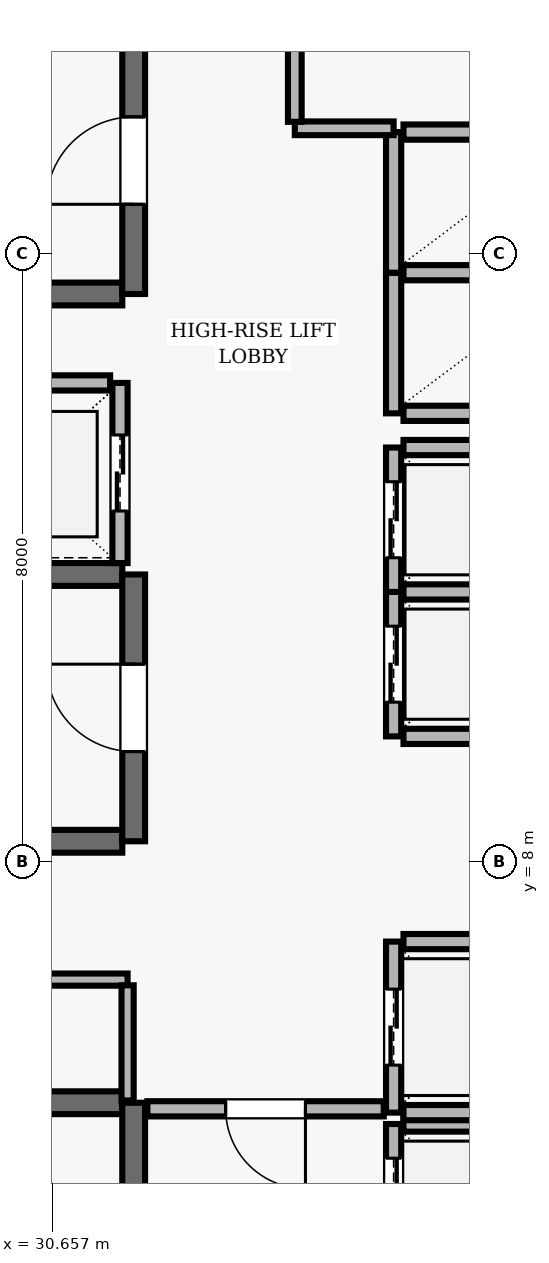
"""IFC4 building model, lengths in metres.
Left out: names, types, materials, properties, quantities, classifications, styles, units other than length and angle.
Written with IfcOpenShell. Run it as: python <this file> out.ifc"""

import sys

from ifc_helpers import new_model, si_unit, direction, frame, frame_2d, origin, place, context, subcontext, project, spatial, rectangle, extrude, element, fill, save


model = new_model("IFC4")
c1 = context("Model", 3, precision=1e-05, world=origin(), true_north=direction((0.0, 1.0)))
c2 = subcontext(c1, "Body", "Model", "MODEL_VIEW")
j1 = project(units=[si_unit("LENGTHUNIT", "METRE"), si_unit("PLANEANGLEUNIT", "RADIAN")], contexts=[c1])
p1 = place(None, origin())
s1 = spatial("IfcSite", under=j1, at=p1, CompositionType="ELEMENT")
p2 = place(p1, origin())
s2 = spatial("IfcBuilding", under=s1, at=p2, CompositionType="ELEMENT")
p3 = place(p2, frame((0.0, 0.0, 279.4)))
s3 = spatial("IfcBuildingStorey", under=s2, at=p3, CompositionType="ELEMENT", Elevation=279.4)
p4 = place(p3, frame((31.58, 4.83, 0.0), z_axis=(0.0, 0.0, 1.0), x_axis=(-1.0, 0.0, 0.0)))
e1 = element("IfcWall", 1, at=p4, inside=s3, PredefinedType="SHEAR", context=c2, shape_type="SweptSolid", body=[
    extrude(rectangle(XDim=8.36, YDim=0.3, at=frame_2d((4.18, 0.0))), origin(), (0.0, 0.0, 1.0), 3.69),
])
p5 = place(p3, frame((31.73, 0.96, 0.0), z_axis=(0.0, 0.0, 1.0), x_axis=(0.0, 1.0, 0.0)))
e2 = element("IfcWall", 2, at=p5, inside=s3, PredefinedType="SHEAR", context=c2, shape_type="SweptSolid", body=[
    extrude(rectangle(XDim=3.87, YDim=0.3, at=frame_2d((1.935, 0.0))), origin(), (0.0, 0.0, 1.0), 3.69),
])
p6 = place(p5, frame((1.54, 0.0, 0.0)))
e3 = element("IfcOpeningElement", 3, at=p6, cuts=e2, PredefinedType="OPENING", context=c2, shape_type="SweptSolid", body=[
    extrude(rectangle(XDim=1.15, YDim=2.15, at=frame_2d((0.575, 1.075))), frame((0.0, 0.16, 0.0), z_axis=(0.0, -1.0, 0.0), x_axis=(1.0, 0.0, 0.0)), (0.0, 0.0, 1.0), 0.32),
])
p7 = place(p3, frame((23.22, 15.47, 0.0), z_axis=(0.0, 0.0, 1.0), x_axis=(1.0, 0.0, 0.0)))
e4 = element("IfcWall", 4, at=p7, inside=s3, PredefinedType="SHEAR", context=c2, shape_type="SweptSolid", body=[
    extrude(rectangle(XDim=8.36, YDim=0.3, at=frame_2d((4.18, 0.0))), origin(), (0.0, 0.0, 1.0), 3.69),
])
p8 = place(p3, frame((31.73, 15.47, 0.0), z_axis=(0.0, 0.0, 1.0), x_axis=(0.0, 1.0, 0.0)))
e5 = element("IfcWall", 5, at=p8, inside=s3, PredefinedType="SHEAR", context=c2, shape_type="SweptSolid", body=[
    extrude(rectangle(XDim=3.51, YDim=0.3, at=frame_2d((1.755, 0.0))), origin(), (0.0, 0.0, 1.0), 3.69),
])
p9 = place(p8, frame((1.18, 0.0, 0.0)))
e6 = element("IfcOpeningElement", 6, at=p9, cuts=e5, PredefinedType="OPENING", context=c2, shape_type="SweptSolid", body=[
    extrude(rectangle(XDim=1.15, YDim=2.15, at=frame_2d((0.575, 1.075))), frame((0.0, 0.16, 0.0), z_axis=(0.0, -1.0, 0.0), x_axis=(1.0, 0.0, 0.0)), (0.0, 0.0, 1.0), 0.32),
])
for number, where, z_axis, x_axis in (
    (7, (31.58, 11.78, 0.0), (0.0, 0.0, 1.0), (-1.0, 0.0, 0.0)),
    (8, (23.22, 8.27, 0.0), (0.0, 0.0, 1.0), (1.0, 0.0, 0.0)),
):
    element("IfcWall", number, at=place(p3, frame(where, z_axis=z_axis, x_axis=x_axis)), inside=s3, PredefinedType="SHEAR", context=c2, shape_type="SweptSolid", body=[
        extrude(rectangle(XDim=8.36, YDim=0.3, at=frame_2d((4.18, 0.0))), origin(), (0.0, 0.0, 1.0), 3.69),
    ])
p10 = place(p3, frame((31.73, 8.27, 0.0), z_axis=(0.0, 0.0, 1.0), x_axis=(0.0, 1.0, 0.0)))
e9 = element("IfcWall", 9, at=p10, inside=s3, PredefinedType="SHEAR", context=c2, shape_type="SweptSolid", body=[
    extrude(rectangle(XDim=3.51, YDim=0.3, at=frame_2d((1.755, 0.0))), origin(), (0.0, 0.0, 1.0), 3.69),
])
p11 = place(p10, frame((1.18, 0.0, 0.0)))
e10 = element("IfcOpeningElement", 10, at=p11, cuts=e9, PredefinedType="OPENING", context=c2, shape_type="SweptSolid", body=[
    extrude(rectangle(XDim=1.15, YDim=2.15, at=frame_2d((0.575, 1.075))), frame((0.0, 0.16, 0.0), z_axis=(0.0, -1.0, 0.0), x_axis=(1.0, 0.0, 0.0)), (0.0, 0.0, 1.0), 0.32),
])
p12 = place(p3, frame((35.15, 4.55, 0.0), z_axis=(0.0, 0.0, 1.0), x_axis=(0.0, -1.0, 0.0)))
e11 = element("IfcWall", 11, at=p12, inside=s3, PredefinedType="SOLIDWALL", context=c2, shape_type="SweptSolid", body=[
    extrude(rectangle(XDim=2.1, YDim=0.2, at=frame_2d((1.05, 0.0))), origin(), (0.0, 0.0, 1.0), 3.69),
])
p13 = place(p12, frame((0.45, 0.0, 0.0)))
e12 = element("IfcOpeningElement", 12, at=p13, cuts=e11, PredefinedType="OPENING", context=c2, shape_type="SweptSolid", body=[
    extrude(rectangle(XDim=1.2, YDim=2.15, at=frame_2d((0.6, 1.075))), frame((0.0, 0.11, 0.0), z_axis=(0.0, -1.0, 0.0), x_axis=(1.0, 0.0, 0.0)), (0.0, 0.0, 1.0), 0.22),
])
p14 = place(p3, frame((37.42, 4.55, 0.0), z_axis=(0.0, 0.0, 1.0), x_axis=(-1.0, 0.0, 0.0)))
e13 = element("IfcWall", 13, at=p14, inside=s3, PredefinedType="SOLIDWALL", context=c2, shape_type="SweptSolid", body=[
    extrude(rectangle(XDim=2.14, YDim=0.2, at=frame_2d((1.07, 0.0))), origin(), (0.0, 0.0, 1.0), 3.69),
])
p15 = place(p3, frame((35.15, 6.95, 0.0), z_axis=(0.0, 0.0, 1.0), x_axis=(0.0, -1.0, 0.0)))
e14 = element("IfcWall", 14, at=p15, inside=s3, PredefinedType="SOLIDWALL", context=c2, shape_type="SweptSolid", body=[
    extrude(rectangle(XDim=2.25, YDim=0.2, at=frame_2d((1.125, 0.0))), origin(), (0.0, 0.0, 1.0), 3.69),
])
p16 = place(p15, frame((0.625, 0.0, 0.0)))
e15 = element("IfcOpeningElement", 15, at=p16, cuts=e14, PredefinedType="OPENING", context=c2, shape_type="SweptSolid", body=[
    extrude(rectangle(XDim=1.0, YDim=2.1, at=frame_2d((0.5, 1.05))), frame((0.0, 0.11, 0.0), z_axis=(0.0, -1.0, 0.0), x_axis=(1.0, 0.0, 0.0)), (0.0, 0.0, 1.0), 0.22),
])
for number, where, z_axis, x_axis in (
    (16, (35.28, 4.7, 0.0), (0.0, 0.0, 1.0), (1.0, 0.0, 0.0)),
    (17, (37.42, 6.95, 0.0), (0.0, 0.0, 1.0), (-1.0, 0.0, 0.0)),
):
    element("IfcWall", number, at=place(p3, frame(where, z_axis=z_axis, x_axis=x_axis)), inside=s3, PredefinedType="SOLIDWALL", context=c2, shape_type="SweptSolid", body=[
        extrude(rectangle(XDim=2.14, YDim=0.2, at=frame_2d((1.07, 0.0))), origin(), (0.0, 0.0, 1.0), 3.69),
    ])
p17 = place(p3, frame((35.15, 11.55, 0.0), z_axis=(0.0, 0.0, 1.0), x_axis=(0.0, -1.0, 0.0)))
e18 = element("IfcWall", 18, at=p17, inside=s3, PredefinedType="SOLIDWALL", context=c2, shape_type="SweptSolid", body=[
    extrude(rectangle(XDim=1.9, YDim=0.2, at=frame_2d((0.95, 0.0))), origin(), (0.0, 0.0, 1.0), 3.69),
])
p18 = place(p17, frame((0.45, 0.0, 0.0)))
e19 = element("IfcOpeningElement", 19, at=p18, cuts=e18, PredefinedType="OPENING", context=c2, shape_type="SweptSolid", body=[
    extrude(rectangle(XDim=1.0, YDim=2.1, at=frame_2d((0.5, 1.05))), frame((0.0, 0.11, 0.0), z_axis=(0.0, -1.0, 0.0), x_axis=(1.0, 0.0, 0.0)), (0.0, 0.0, 1.0), 0.22),
])
for number, where, z_axis, x_axis in (
    (20, (35.28, 9.65, 0.0), (0.0, 0.0, 1.0), (1.0, 0.0, 0.0)),
    (21, (37.42, 11.55, 0.0), (0.0, 0.0, 1.0), (-1.0, 0.0, 0.0)),
):
    element("IfcWall", number, at=place(p3, frame(where, z_axis=z_axis, x_axis=x_axis)), inside=s3, PredefinedType="SOLIDWALL", context=c2, shape_type="SweptSolid", body=[
        extrude(rectangle(XDim=2.14, YDim=0.2, at=frame_2d((1.07, 0.0))), origin(), (0.0, 0.0, 1.0), 3.69),
    ])
p19 = place(p3, frame((35.15, 13.45, 0.0), z_axis=(0.0, 0.0, 1.0), x_axis=(0.0, -1.0, 0.0)))
e22 = element("IfcWall", 22, at=p19, inside=s3, PredefinedType="SOLIDWALL", context=c2, shape_type="SweptSolid", body=[
    extrude(rectangle(XDim=1.9, YDim=0.2, at=frame_2d((0.95, 0.0))), origin(), (0.0, 0.0, 1.0), 3.69),
])
p20 = place(p19, frame((0.45, 0.0, 0.0)))
e23 = element("IfcOpeningElement", 23, at=p20, cuts=e22, PredefinedType="OPENING", context=c2, shape_type="SweptSolid", body=[
    extrude(rectangle(XDim=1.0, YDim=2.1, at=frame_2d((0.5, 1.05))), frame((0.0, 0.11, 0.0), z_axis=(0.0, -1.0, 0.0), x_axis=(1.0, 0.0, 0.0)), (0.0, 0.0, 1.0), 0.22),
])
p21 = place(p3, frame((37.42, 13.45, 0.0), z_axis=(0.0, 0.0, 1.0), x_axis=(-1.0, 0.0, 0.0)))
e24 = element("IfcWall", 24, at=p21, inside=s3, PredefinedType="SOLIDWALL", context=c2, shape_type="SweptSolid", body=[
    extrude(rectangle(XDim=2.14, YDim=0.2, at=frame_2d((1.07, 0.0))), origin(), (0.0, 0.0, 1.0), 3.69),
])
p22 = place(p3, frame((31.55, 11.93, 0.0), z_axis=(0.0, 0.0, 1.0), x_axis=(0.0, 1.0, 0.0)))
e25 = element("IfcWall", 25, at=p22, inside=s3, PredefinedType="SOLIDWALL", context=c2, shape_type="SweptSolid", body=[
    extrude(rectangle(XDim=2.37, YDim=0.2, at=frame_2d((1.185, 0.0))), origin(), (0.0, 0.0, 1.0), 3.69),
])
p23 = place(p22, frame((0.685, 0.0, 0.0)))
e26 = element("IfcOpeningElement", 26, at=p23, cuts=e25, PredefinedType="OPENING", context=c2, shape_type="SweptSolid", body=[
    extrude(rectangle(XDim=1.0, YDim=2.1, at=frame_2d((0.5, 1.05))), frame((0.0, 0.11, 0.0), z_axis=(0.0, -1.0, 0.0), x_axis=(1.0, 0.0, 0.0)), (0.0, 0.0, 1.0), 0.22),
])
p24 = place(p3, frame((31.42, 14.3, 0.0), z_axis=(0.0, 0.0, 1.0), x_axis=(-1.0, 0.0, 0.0)))
e27 = element("IfcWall", 27, at=p24, inside=s3, PredefinedType="SOLIDWALL", context=c2, shape_type="SweptSolid", body=[
    extrude(rectangle(XDim=2.44, YDim=0.2, at=frame_2d((1.22, 0.0))), origin(), (0.0, 0.0, 1.0), 3.69),
])
p25 = place(p3, frame((35.15, 15.75, 0.0), z_axis=(0.0, 0.0, 1.0), x_axis=(0.0, -1.0, 0.0)))
e28 = element("IfcWall", 28, at=p25, inside=s3, PredefinedType="SOLIDWALL", context=c2, shape_type="SweptSolid", body=[
    extrude(rectangle(XDim=1.85, YDim=0.2, at=frame_2d((0.925, 0.0))), origin(), (0.0, 0.0, 1.0), 3.69),
])
for number, where, z_axis, x_axis in (
    (29, (35.28, 13.9, 0.0), (0.0, 0.0, 1.0), (1.0, 0.0, 0.0)),
    (30, (37.42, 15.75, 0.0), (0.0, 0.0, 1.0), (-1.0, 0.0, 0.0)),
):
    element("IfcWall", number, at=place(p3, frame(where, z_axis=z_axis, x_axis=x_axis)), inside=s3, PredefinedType="SOLIDWALL", context=c2, shape_type="SweptSolid", body=[
        extrude(rectangle(XDim=2.14, YDim=0.2, at=frame_2d((1.07, 0.0))), origin(), (0.0, 0.0, 1.0), 3.69),
    ])
p26 = place(p3, frame((35.15, 17.6, 0.0), z_axis=(0.0, 0.0, 1.0), x_axis=(0.0, -1.0, 0.0)))
e31 = element("IfcWall", 31, at=p26, inside=s3, PredefinedType="SOLIDWALL", context=c2, shape_type="SweptSolid", body=[
    extrude(rectangle(XDim=1.85, YDim=0.2, at=frame_2d((0.925, 0.0))), origin(), (0.0, 0.0, 1.0), 3.69),
])
p27 = place(p3, frame((37.42, 17.6, 0.0), z_axis=(0.0, 0.0, 1.0), x_axis=(-1.0, 0.0, 0.0)))
e32 = element("IfcWall", 32, at=p27, inside=s3, PredefinedType="SOLIDWALL", context=c2, shape_type="SweptSolid", body=[
    extrude(rectangle(XDim=2.14, YDim=0.2, at=frame_2d((1.07, 0.0))), origin(), (0.0, 0.0, 1.0), 3.69),
])
p28 = place(p3, frame((28.55, 6.45, 0.0), z_axis=(0.0, 0.0, 1.0), x_axis=(1.0, 0.0, 0.0)))
e33 = element("IfcWall", 33, at=p28, inside=s3, PredefinedType="PARTITIONING", context=c2, shape_type="SweptSolid", body=[
    extrude(rectangle(XDim=3.1, YDim=0.16, at=frame_2d((1.55, 0.0))), origin(), (0.0, 0.0, 1.0), 3.69),
])
p29 = place(p28, frame((1.11, 0.0, 0.0)))
e34 = element("IfcOpeningElement", 34, at=p29, cuts=e33, PredefinedType="OPENING", context=c2, shape_type="SweptSolid", body=[
    extrude(rectangle(XDim=0.88, YDim=2.1, at=frame_2d((0.44, 1.05))), frame((0.0, 0.09, 0.0), z_axis=(0.0, -1.0, 0.0), x_axis=(1.0, 0.0, 0.0)), (0.0, 0.0, 1.0), 0.18),
])
p30 = place(p3, frame((33.85, 17.65, 0.0), z_axis=(0.0, 0.0, 1.0), x_axis=(1.0, 0.0, 0.0)))
e35 = element("IfcWall", 35, at=p30, inside=s3, PredefinedType="PARTITIONING", context=c2, shape_type="SweptSolid", body=[
    extrude(rectangle(XDim=1.3, YDim=0.18, at=frame_2d((0.65, 0.0))), origin(), (0.0, 0.0, 1.0), 3.69),
])
p31 = place(p3, frame((35.02, 4.75, 0.0), z_axis=(0.0, 0.0, 1.0), x_axis=(-1.0, 0.0, 0.0)))
e36 = element("IfcWall", 36, at=p31, inside=s3, PredefinedType="SOLIDWALL", context=c2, shape_type="SweptSolid", body=[
    extrude(rectangle(XDim=3.11, YDim=0.2, at=frame_2d((1.555, 0.0))), origin(), (0.0, 0.0, 1.0), 3.69),
])
p32 = place(p31, frame((1.03, 0.0, 0.0)))
e37 = element("IfcOpeningElement", 37, at=p32, cuts=e36, PredefinedType="OPENING", context=c2, shape_type="SweptSolid", body=[
    extrude(rectangle(XDim=1.05, YDim=2.15, at=frame_2d((0.525, 1.075))), frame((0.0, 0.11, 0.0), z_axis=(0.0, -1.0, 0.0), x_axis=(1.0, 0.0, 0.0)), (0.0, 0.0, 1.0), 0.22),
])
p33 = place(p3, frame((31.65, 4.86, 0.0), z_axis=(0.0, 0.0, 1.0), x_axis=(0.0, 1.0, 0.0)))
e38 = element("IfcWall", 38, at=p33, inside=s3, PredefinedType="PARTITIONING", context=c2, shape_type="SweptSolid", body=[
    extrude(rectangle(XDim=1.515, YDim=0.16, at=frame_2d((0.757, 0.0))), origin(), (0.0, 0.0, 1.0), 3.69),
])
p34 = place(p3, frame((33.85, 17.735, 0.0), z_axis=(0.0, 0.0, 1.0), x_axis=(0.0, 1.0, 0.0)))
e39 = element("IfcWall", 39, at=p34, inside=s3, PredefinedType="PARTITIONING", context=c2, shape_type="SweptSolid", body=[
    extrude(rectangle(XDim=6.03, YDim=0.18, at=frame_2d((3.015, 0.0))), origin(), (0.0, 0.0, 1.0), 3.69),
])
p35 = place(p34, frame((2.54, 0.0, 0.0)))
e40 = element("IfcOpeningElement", 40, at=p35, cuts=e39, PredefinedType="OPENING", context=c2, shape_type="SweptSolid", body=[
    extrude(rectangle(XDim=0.95, YDim=2.1, at=frame_2d((0.475, 1.05))), frame((0.0, 0.1, 0.0), z_axis=(0.0, -1.0, 0.0), x_axis=(1.0, 0.0, 0.0)), (0.0, 0.0, 1.0), 0.2),
])
p36 = place(p9, origin())
e41 = element("IfcDoor", 41, at=p36, inside=s3, OperationType="SINGLE_SWING_LEFT", PredefinedType="DOOR", context=c2, shape_type="SweptSolid", body=[
    extrude(rectangle(XDim=1.15, YDim=2.15, at=frame_2d((0.575, 1.075))), frame((0.0, 0.025, 0.0), z_axis=(0.0, -1.0, 0.0), x_axis=(1.0, 0.0, 0.0)), (0.0, 0.0, 1.0), 0.05),
])
fill(e6, e41)
p37 = place(p11, origin())
e42 = element("IfcDoor", 42, at=p37, inside=s3, OperationType="SINGLE_SWING_RIGHT", PredefinedType="DOOR", context=c2, shape_type="SweptSolid", body=[
    extrude(rectangle(XDim=1.15, YDim=2.15, at=frame_2d((0.575, 1.075))), frame((0.0, 0.025, 0.0), z_axis=(0.0, -1.0, 0.0), x_axis=(1.0, 0.0, 0.0)), (0.0, 0.0, 1.0), 0.05),
])
fill(e10, e42)
p38 = place(p13, origin())
e43 = element("IfcDoor", 43, at=p38, inside=s3, OperationType="DOUBLE_DOOR_SLIDING", PredefinedType="DOOR", context=c2, shape_type="SweptSolid", body=[
    extrude(rectangle(XDim=1.2, YDim=2.15, at=frame_2d((0.6, 1.075))), frame((0.0, 0.025, 0.0), z_axis=(0.0, -1.0, 0.0), x_axis=(1.0, 0.0, 0.0)), (0.0, 0.0, 1.0), 0.05),
])
fill(e12, e43)
p39 = place(p16, origin())
e44 = element("IfcDoor", 44, at=p39, inside=s3, OperationType="DOUBLE_DOOR_SLIDING", PredefinedType="DOOR", context=c2, shape_type="SweptSolid", body=[
    extrude(rectangle(XDim=1.0, YDim=2.1, at=frame_2d((0.5, 1.05))), frame((0.0, 0.025, 0.0), z_axis=(0.0, -1.0, 0.0), x_axis=(1.0, 0.0, 0.0)), (0.0, 0.0, 1.0), 0.05),
])
fill(e15, e44)
p40 = place(p18, origin())
e45 = element("IfcDoor", 45, at=p40, inside=s3, OperationType="DOUBLE_DOOR_SLIDING", PredefinedType="DOOR", context=c2, shape_type="SweptSolid", body=[
    extrude(rectangle(XDim=1.0, YDim=2.1, at=frame_2d((0.5, 1.05))), frame((0.0, 0.025, 0.0), z_axis=(0.0, -1.0, 0.0), x_axis=(1.0, 0.0, 0.0)), (0.0, 0.0, 1.0), 0.05),
])
fill(e19, e45)
p41 = place(p20, origin())
e46 = element("IfcDoor", 46, at=p41, inside=s3, OperationType="DOUBLE_DOOR_SLIDING", PredefinedType="DOOR", context=c2, shape_type="SweptSolid", body=[
    extrude(rectangle(XDim=1.0, YDim=2.1, at=frame_2d((0.5, 1.05))), frame((0.0, 0.025, 0.0), z_axis=(0.0, -1.0, 0.0), x_axis=(1.0, 0.0, 0.0)), (0.0, 0.0, 1.0), 0.05),
])
fill(e23, e46)
p42 = place(p23, origin())
e47 = element("IfcDoor", 47, at=p42, inside=s3, OperationType="DOUBLE_DOOR_SLIDING", PredefinedType="DOOR", context=c2, shape_type="SweptSolid", body=[
    extrude(rectangle(XDim=1.0, YDim=2.1, at=frame_2d((0.5, 1.05))), frame((0.0, 0.025, 0.0), z_axis=(0.0, -1.0, 0.0), x_axis=(1.0, 0.0, 0.0)), (0.0, 0.0, 1.0), 0.05),
])
fill(e26, e47)
p43 = place(p32, origin())
e48 = element("IfcDoor", 48, at=p43, inside=s3, OperationType="SINGLE_SWING_LEFT", PredefinedType="DOOR", context=c2, shape_type="SweptSolid", body=[
    extrude(rectangle(XDim=1.05, YDim=2.15, at=frame_2d((0.525, 1.075))), frame((0.0, 0.025, 0.0), z_axis=(0.0, -1.0, 0.0), x_axis=(1.0, 0.0, 0.0)), (0.0, 0.0, 1.0), 0.05),
])
fill(e37, e48)
save(model, sys.argv[1])
